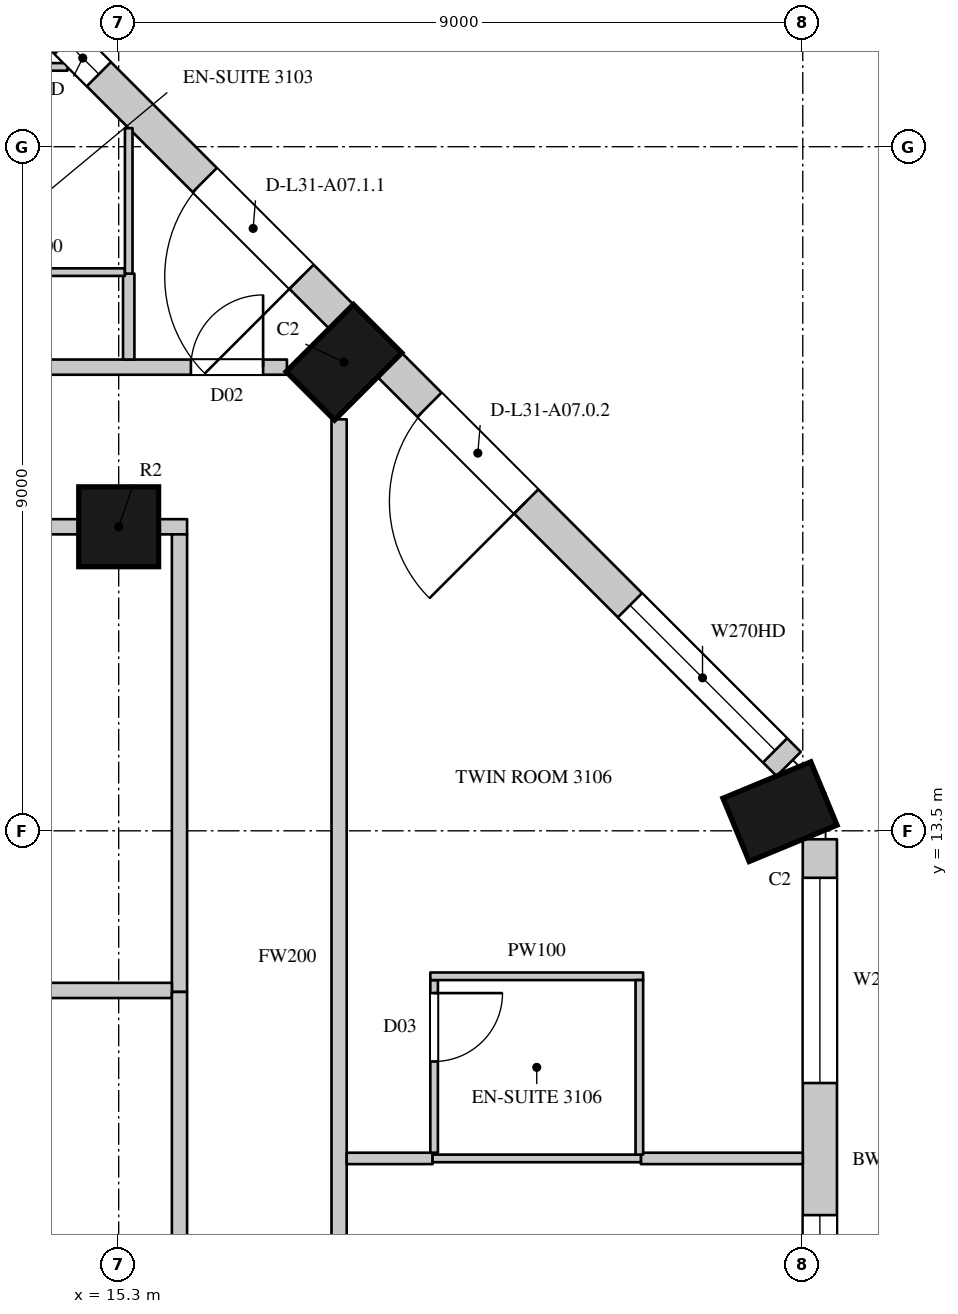
"""IFC4 building model, lengths in metres.
Left out: names, types, materials, properties, quantities, classifications, styles, units other than length and angle.
Written with IfcOpenShell. Run it as: python <this file> out.ifc"""

import sys

from ifc_helpers import new_model, si_unit, direction, frame, frame_2d, origin, origin_2d, place, context, subcontext, project, spatial, rectangle, circle, extrude, element, fill, save


model = new_model("IFC4")
c1 = context("Model", 3, precision=1e-05, world=origin(), true_north=direction((0.0, 1.0)))
c2 = subcontext(c1, "Body", "Model", "MODEL_VIEW")
j1 = project(units=[si_unit("LENGTHUNIT", "METRE"), si_unit("PLANEANGLEUNIT", "RADIAN")], contexts=[c1])
p1 = place(None, origin())
s1 = spatial("IfcSite", under=j1, at=p1, CompositionType="ELEMENT")
p2 = place(p1, origin())
s2 = spatial("IfcBuilding", under=s1, at=p2, CompositionType="ELEMENT")
p3 = place(p2, frame((0.0, 0.0, 141.9)))
s3 = spatial("IfcBuildingStorey", under=s2, at=p3, CompositionType="ELEMENT", Elevation=141.9)
for number, where, z_axis, x_axis in (
    (1, (24.0, 13.752, 0.0), (0.0, 0.0, 1.0), (-0.383, 0.924, 0.0)),
    (2, (18.264, 19.664, 0.0), (0.0, 0.0, 1.0), (-0.707, 0.707, 0.0)),
):
    element("IfcColumn", number, at=place(p3, frame(where, z_axis=z_axis, x_axis=x_axis)), inside=s3, PredefinedType="COLUMN", context=c2, shape_type="SweptSolid", body=[
        extrude(rectangle(XDim=0.9, YDim=1.25, at=origin_2d()), origin(), (0.0, 0.0, 1.0), 3.6),
    ])
p4 = place(p3, frame((15.3, 17.5, 0.0), z_axis=(0.0, 0.0, 1.0), x_axis=(1.0, 0.0, 0.0)))
e3 = element("IfcColumn", 3, at=p4, inside=s3, PredefinedType="COLUMN", context=c2, shape_type="SweptSolid", body=[
    extrude(circle(Radius=0.525, at=origin_2d()), origin(), (0.0, 0.0, 1.0), 3.6),
])
p5 = place(p3, frame((24.525, 4.95, 0.0), z_axis=(0.0, 0.0, 1.0), x_axis=(0.0, 1.0, 0.0)))
e4 = element("IfcWall", 4, at=p5, inside=s3, PredefinedType="SOLIDWALL", context=c2, shape_type="SweptSolid", body=[
    extrude(rectangle(XDim=8.439, YDim=0.45, at=frame_2d((4.219, 0.0))), origin(), (0.0, 0.0, 1.0), 3.3),
])
p6 = place(p5, frame((0.294, 0.0, 0.0)))
e5 = element("IfcOpeningElement", 5, at=p6, cuts=e4, PredefinedType="OPENING", context=c2, shape_type="SweptSolid", body=[
    extrude(rectangle(XDim=1.8, YDim=2.4, at=frame_2d((0.9, 1.2))), frame((0.0, 0.235, 0.0), z_axis=(0.0, -1.0, 0.0), x_axis=(1.0, 0.0, 0.0)), (0.0, 0.0, 1.0), 0.47),
])
p7 = place(p5, frame((2.294, 0.0, 1.05)))
e6 = element("IfcOpeningElement", 6, at=p7, cuts=e4, PredefinedType="OPENING", context=c2, shape_type="SweptSolid", body=[
    extrude(rectangle(XDim=1.2, YDim=2.0, at=frame_2d((0.6, 1.0))), frame((0.0, 0.235, 0.0), z_axis=(0.0, -1.0, 0.0), x_axis=(1.0, 0.0, 0.0)), (0.0, 0.0, 1.0), 0.47),
])
p8 = place(p5, frame((5.232, 0.0, 1.05)))
e7 = element("IfcOpeningElement", 7, at=p8, cuts=e4, PredefinedType="OPENING", context=c2, shape_type="SweptSolid", body=[
    extrude(rectangle(XDim=2.7, YDim=2.0, at=frame_2d((1.35, 1.0))), frame((0.0, 0.235, 0.0), z_axis=(0.0, -1.0, 0.0), x_axis=(1.0, 0.0, 0.0)), (0.0, 0.0, 1.0), 0.47),
])
p9 = place(p3, frame((24.115, 14.379, 0.0), z_axis=(0.0, 0.0, 1.0), x_axis=(-0.707106781187, 0.707106781187, 0.0)))
e8 = element("IfcWall", 8, at=p9, inside=s3, PredefinedType="SOLIDWALL", context=c2, shape_type="SweptSolid", body=[
    extrude(rectangle(XDim=7.424, YDim=0.45, at=frame_2d((3.712, 0.0))), origin(), (0.0, 0.0, 1.0), 3.3),
])
p10 = place(p9, frame((0.253, 0.0, 1.05)))
e9 = element("IfcOpeningElement", 9, at=p10, cuts=e8, PredefinedType="OPENING", context=c2, shape_type="SweptSolid", body=[
    extrude(rectangle(XDim=2.7, YDim=2.0, at=frame_2d((1.35, 1.0))), frame((0.0, 0.235, 0.0), z_axis=(0.0, -1.0, 0.0), x_axis=(1.0, 0.0, 0.0)), (0.0, 0.0, 1.0), 0.47),
])
p11 = place(p9, frame((4.884, 0.0, 0.0)))
e10 = element("IfcOpeningElement", 10, at=p11, cuts=e8, PredefinedType="OPENING", context=c2, shape_type="SweptSolid", body=[
    extrude(rectangle(XDim=1.8, YDim=2.4, at=frame_2d((0.9, 1.2))), frame((0.0, 0.235, 0.0), z_axis=(0.0, -1.0, 0.0), x_axis=(1.0, 0.0, 0.0)), (0.0, 0.0, 1.0), 0.47),
])
p12 = place(p3, frame((18.229, 20.265, 0.0), z_axis=(0.0, 0.0, 1.0), x_axis=(-0.707106781187, 0.707106781187, 0.0)))
e11 = element("IfcWall", 11, at=p12, inside=s3, PredefinedType="SOLIDWALL", context=c2, shape_type="SweptSolid", body=[
    extrude(rectangle(XDim=7.424, YDim=0.45, at=frame_2d((3.712, 0.0))), origin(), (0.0, 0.0, 1.0), 3.3),
])
p13 = place(p12, frame((0.74, 0.0, 0.0)))
e12 = element("IfcOpeningElement", 12, at=p13, cuts=e11, PredefinedType="OPENING", context=c2, shape_type="SweptSolid", body=[
    extrude(rectangle(XDim=1.8, YDim=2.4, at=frame_2d((0.9, 1.2))), frame((0.0, 0.235, 0.0), z_axis=(0.0, -1.0, 0.0), x_axis=(1.0, 0.0, 0.0)), (0.0, 0.0, 1.0), 0.47),
])
p14 = place(p12, frame((4.51, 0.0, 1.05)))
e13 = element("IfcOpeningElement", 13, at=p14, cuts=e11, PredefinedType="OPENING", context=c2, shape_type="SweptSolid", body=[
    extrude(rectangle(XDim=0.6, YDim=2.0, at=frame_2d((0.3, 1.0))), frame((0.0, 0.235, 0.0), z_axis=(0.0, -1.0, 0.0), x_axis=(1.0, 0.0, 0.0)), (0.0, 0.0, 1.0), 0.47),
])
p15 = place(p12, frame((5.861, 0.0, 1.05)))
e14 = element("IfcOpeningElement", 14, at=p15, cuts=e11, PredefinedType="OPENING", context=c2, shape_type="SweptSolid", body=[
    extrude(rectangle(XDim=1.2, YDim=2.0, at=frame_2d((0.6, 1.0))), frame((0.0, 0.235, 0.0), z_axis=(0.0, -1.0, 0.0), x_axis=(1.0, 0.0, 0.0)), (0.0, 0.0, 1.0), 0.47),
])
p16 = place(p3, frame((23.15, 16.864, 0.0), z_axis=(0.0, 0.0, 1.0), x_axis=(-0.707106781187, 0.707106781187, 0.0)))
e15 = element("IfcWall", 15, at=p16, inside=s3, PredefinedType="SOLIDWALL", context=c2, shape_type="SweptSolid", body=[
    extrude(rectangle(XDim=1.445, YDim=0.45, at=frame_2d((0.722, 0.0))), origin(), (0.0, 0.0, 1.0), 0.6),
])
p17 = place(p3, frame((19.937, 20.078, 0.0), z_axis=(0.0, 0.0, 1.0), x_axis=(-0.707106781187, 0.707106781187, 0.0)))
e16 = element("IfcWall", 16, at=p17, inside=s3, PredefinedType="SOLIDWALL", context=c2, shape_type="SweptSolid", body=[
    extrude(rectangle(XDim=1.781, YDim=0.45, at=frame_2d((0.89, 0.0))), origin(), (0.0, 0.0, 1.0), 0.6),
])
p18 = place(p3, frame((16.486, 23.529, 0.0), z_axis=(0.0, 0.0, 1.0), x_axis=(-0.707022305137, 0.707191247145, 0.0)))
e17 = element("IfcWall", 17, at=p18, inside=s3, PredefinedType="SOLIDWALL", context=c2, shape_type="SweptSolid", body=[
    extrude(rectangle(XDim=1.445, YDim=0.45, at=frame_2d((0.723, 0.0))), origin(), (0.0, 0.0, 1.0), 0.6),
])
p19 = place(p3, frame((-20.7, 19.6, 0.0), z_axis=(0.0, 0.0, 1.0), x_axis=(1.0, 0.0, 0.0)))
e18 = element("IfcWall", 18, at=p19, inside=s3, PredefinedType="PARTITIONING", context=c2, shape_type="SweptSolid", body=[
    extrude(rectangle(XDim=38.214, YDim=0.2, at=frame_2d((19.107, 0.0))), origin(), (0.0, 0.0, 1.0), 3.3),
])
p20 = place(p19, frame((23.95, 0.0, 0.0)))
e19 = element("IfcOpeningElement", 19, at=p20, cuts=e18, PredefinedType="OPENING", context=c2, shape_type="SweptSolid", body=[
    extrude(rectangle(XDim=0.9, YDim=2.2, at=frame_2d((0.45, 1.1))), frame((0.0, 0.11, 0.0), z_axis=(0.0, -1.0, 0.0), x_axis=(1.0, 0.0, 0.0)), (0.0, 0.0, 1.0), 0.22),
])
p21 = place(p19, frame((2.05, 0.0, 0.0)))
e20 = element("IfcOpeningElement", 20, at=p21, cuts=e18, PredefinedType="OPENING", context=c2, shape_type="SweptSolid", body=[
    extrude(rectangle(XDim=1.1, YDim=2.4, at=frame_2d((0.55, 1.2))), frame((0.0, 0.11, 0.0), z_axis=(0.0, -1.0, 0.0), x_axis=(1.0, 0.0, 0.0)), (0.0, 0.0, 1.0), 0.22),
])
p22 = place(p19, frame((12.15, 0.0, 0.0)))
e21 = element("IfcOpeningElement", 21, at=p22, cuts=e18, PredefinedType="OPENING", context=c2, shape_type="SweptSolid", body=[
    extrude(rectangle(XDim=1.1, YDim=2.4, at=frame_2d((0.55, 1.2))), frame((0.0, 0.11, 0.0), z_axis=(0.0, -1.0, 0.0), x_axis=(1.0, 0.0, 0.0)), (0.0, 0.0, 1.0), 0.22),
])
p23 = place(p19, frame((30.2, 0.0, 0.0)))
e22 = element("IfcOpeningElement", 22, at=p23, cuts=e18, PredefinedType="OPENING", context=c2, shape_type="SweptSolid", body=[
    extrude(rectangle(XDim=0.95, YDim=2.2, at=frame_2d((0.475, 1.1))), frame((0.0, 0.11, 0.0), z_axis=(0.0, -1.0, 0.0), x_axis=(1.0, 0.0, 0.0)), (0.0, 0.0, 1.0), 0.22),
])
p24 = place(p19, frame((36.95, 0.0, 0.0)))
e23 = element("IfcOpeningElement", 23, at=p24, cuts=e18, PredefinedType="OPENING", context=c2, shape_type="SweptSolid", body=[
    extrude(rectangle(XDim=0.95, YDim=2.2, at=frame_2d((0.475, 1.1))), frame((0.0, 0.11, 0.0), z_axis=(0.0, -1.0, 0.0), x_axis=(1.0, 0.0, 0.0)), (0.0, 0.0, 1.0), 0.22),
])
p25 = place(p3, frame((6.825, 17.5, 0.0), z_axis=(0.0, 0.0, 1.0), x_axis=(1.0, 0.0, 0.0)))
e24 = element("IfcWall", 24, at=p25, inside=s3, PredefinedType="PARTITIONING", context=c2, shape_type="SweptSolid", body=[
    extrude(rectangle(XDim=7.95, YDim=0.2, at=frame_2d((3.975, 0.0))), origin(), (0.0, 0.0, 1.0), 2.75),
])
p26 = place(p25, frame((3.8, 0.0, 0.0)))
e25 = element("IfcOpeningElement", 25, at=p26, cuts=e24, PredefinedType="OPENING", context=c2, shape_type="SweptSolid", body=[
    extrude(rectangle(XDim=0.95, YDim=2.2, at=frame_2d((0.475, 1.1))), frame((0.0, 0.11, 0.0), z_axis=(0.0, -1.0, 0.0), x_axis=(1.0, 0.0, 0.0)), (0.0, 0.0, 1.0), 0.22),
])
p27 = place(p3, frame((15.825, 17.5, 0.0), z_axis=(0.0, 0.0, 1.0), x_axis=(1.0, 0.0, 0.0)))
e26 = element("IfcWall", 26, at=p27, inside=s3, PredefinedType="PARTITIONING", context=c2, shape_type="SweptSolid", body=[
    extrude(rectangle(XDim=0.375, YDim=0.2, at=frame_2d((0.188, 0.0))), origin(), (0.0, 0.0, 1.0), 3.3),
])
p28 = place(p3, frame((16.1, 11.38, 0.0), z_axis=(0.0, 0.0, 1.0), x_axis=(0.0, 1.0, 0.0)))
e27 = element("IfcWall", 27, at=p28, inside=s3, PredefinedType="PARTITIONING", context=c2, shape_type="SweptSolid", body=[
    extrude(rectangle(XDim=6.02, YDim=0.2, at=frame_2d((3.01, 0.0))), origin(), (0.0, 0.0, 1.0), 3.3),
])
p29 = place(p3, frame((18.2, 4.75, 0.0), z_axis=(0.0, 0.0, 1.0), x_axis=(0.0, 1.0, 0.0)))
e28 = element("IfcWall", 28, at=p29, inside=s3, PredefinedType="PARTITIONING", context=c2, shape_type="SweptSolid", body=[
    extrude(rectangle(XDim=14.164, YDim=0.2, at=frame_2d((7.082, 0.0))), origin(), (0.0, 0.0, 1.0), 3.3),
])
p30 = place(p29, frame((1.7, 0.0, 0.0)))
e29 = element("IfcOpeningElement", 29, at=p30, cuts=e28, PredefinedType="OPENING", context=c2, shape_type="SweptSolid", body=[
    extrude(rectangle(XDim=0.9, YDim=2.2, at=frame_2d((0.45, 1.1))), frame((0.0, 0.11, 0.0), z_axis=(0.0, -1.0, 0.0), x_axis=(1.0, 0.0, 0.0)), (0.0, 0.0, 1.0), 0.22),
])
p31 = place(p3, frame((15.432, 19.7, 0.0), z_axis=(0.0, 0.0, 1.0), x_axis=(0.0, 1.0, 0.0)))
e30 = element("IfcWall", 30, at=p31, inside=s3, PredefinedType="PARTITIONING", context=c2, shape_type="SweptSolid", body=[
    extrude(rectangle(XDim=1.13, YDim=0.15, at=frame_2d((0.565, 0.0))), origin(), (0.0, 0.0, 1.0), 3.3),
])
p32 = place(p3, frame((18.3, 9.19, 0.0), z_axis=(0.0, 0.0, 1.0), x_axis=(1.0, 0.0, 0.0)))
e31 = element("IfcWall", 31, at=p32, inside=s3, PredefinedType="PARTITIONING", context=c2, shape_type="SweptSolid", body=[
    extrude(rectangle(XDim=1.13, YDim=0.15, at=frame_2d((0.565, 0.0))), origin(), (0.0, 0.0, 1.0), 3.3),
])
p33 = place(p3, frame((22.17, 9.19, 0.0), z_axis=(0.0, 0.0, 1.0), x_axis=(1.0, 0.0, 0.0)))
e32 = element("IfcWall", 32, at=p33, inside=s3, PredefinedType="PARTITIONING", context=c2, shape_type="SweptSolid", body=[
    extrude(rectangle(XDim=2.13, YDim=0.15, at=frame_2d((1.065, 0.0))), origin(), (0.0, 0.0, 1.0), 3.3),
])
p34 = place(p3, frame((10.4, 11.4, 0.0), z_axis=(0.0, 0.0, 1.0), x_axis=(1.0, 0.0, 0.0)))
e33 = element("IfcWall", 33, at=p34, inside=s3, PredefinedType="PARTITIONING", context=c2, shape_type="SweptSolid", body=[
    extrude(rectangle(XDim=5.6, YDim=0.2, at=frame_2d((2.8, 0.0))), origin(), (0.0, 0.0, 1.0), 3.3),
])
p35 = place(p3, frame((16.1, 6.825, 0.0), z_axis=(0.0, 0.0, 1.0), x_axis=(0.0, 1.0, 0.0)))
e34 = element("IfcWall", 34, at=p35, inside=s3, PredefinedType="PARTITIONING", context=c2, shape_type="SweptSolid", body=[
    extrude(rectangle(XDim=4.555, YDim=0.2, at=frame_2d((2.277, 0.0))), origin(), (0.0, 0.0, 1.0), 3.3),
])
p36 = place(p3, frame((12.986, 20.85, 0.0), z_axis=(0.0, 0.0, 1.0), x_axis=(1.0, 0.0, 0.0)))
e35 = element("IfcWall", 35, at=p36, inside=s3, PredefinedType="PARTITIONING", context=c2, shape_type="SweptSolid", body=[
    extrude(rectangle(XDim=2.396, YDim=0.1, at=frame_2d((1.198, 0.0))), origin(), (0.0, 0.0, 1.0), 3.3),
])
p37 = place(p3, frame((12.986, 23.55, 0.0), z_axis=(0.0, 0.0, 1.0), x_axis=(1.0, 0.0, 0.0)))
e36 = element("IfcWall", 36, at=p37, inside=s3, PredefinedType="PARTITIONING", context=c2, shape_type="SweptSolid", body=[
    extrude(rectangle(XDim=1.64, YDim=0.1, at=frame_2d((0.82, 0.0))), origin(), (0.0, 0.0, 1.0), 3.3),
])
p38 = place(p3, frame((15.432, 20.83, 0.0), z_axis=(0.0, 0.0, 1.0), x_axis=(0.0, 1.0, 0.0)))
e37 = element("IfcWall", 37, at=p38, inside=s3, PredefinedType="PARTITIONING", context=c2, shape_type="SweptSolid", body=[
    extrude(rectangle(XDim=1.914, YDim=0.1, at=frame_2d((0.957, 0.0))), origin(), (0.0, 0.0, 1.0), 3.3),
])
p39 = place(p3, frame((19.43, 9.19, 0.0), z_axis=(0.0, 0.0, 1.0), x_axis=(1.0, 0.0, 0.0)))
e38 = element("IfcWall", 38, at=p39, inside=s3, PredefinedType="PARTITIONING", context=c2, shape_type="SweptSolid", body=[
    extrude(rectangle(XDim=2.74, YDim=0.1, at=frame_2d((1.37, 0.0))), origin(), (0.0, 0.0, 1.0), 3.3),
])
p40 = place(p3, frame((19.45, 9.265, 0.0), z_axis=(0.0, 0.0, 1.0), x_axis=(0.0, 1.0, 0.0)))
e39 = element("IfcWall", 39, at=p40, inside=s3, PredefinedType="PARTITIONING", context=c2, shape_type="SweptSolid", body=[
    extrude(rectangle(XDim=2.271, YDim=0.1, at=frame_2d((1.135, 0.0))), origin(), (0.0, 0.0, 1.0), 3.3),
])
p41 = place(p40, frame((1.2, 0.0, 0.0)))
e40 = element("IfcOpeningElement", 40, at=p41, cuts=e39, PredefinedType="OPENING", context=c2, shape_type="SweptSolid", body=[
    extrude(rectangle(XDim=0.9, YDim=2.2, at=frame_2d((0.45, 1.1))), frame((0.0, 0.06, 0.0), z_axis=(0.0, -1.0, 0.0), x_axis=(1.0, 0.0, 0.0)), (0.0, 0.0, 1.0), 0.12),
])
p42 = place(p3, frame((19.4, 11.586, 0.0), z_axis=(0.0, 0.0, 1.0), x_axis=(1.0, 0.0, 0.0)))
e41 = element("IfcWall", 41, at=p42, inside=s3, PredefinedType="PARTITIONING", context=c2, shape_type="SweptSolid", body=[
    extrude(rectangle(XDim=2.8, YDim=0.1, at=frame_2d((1.4, 0.0))), origin(), (0.0, 0.0, 1.0), 3.3),
])
p43 = place(p3, frame((22.15, 9.24, 0.0), z_axis=(0.0, 0.0, 1.0), x_axis=(0.0, 1.0, 0.0)))
e42 = element("IfcWall", 42, at=p43, inside=s3, PredefinedType="PARTITIONING", context=c2, shape_type="SweptSolid", body=[
    extrude(rectangle(XDim=2.296, YDim=0.1, at=frame_2d((1.148, 0.0))), origin(), (0.0, 0.0, 1.0), 3.3),
])
p44 = place(p7, origin())
e43 = element("IfcWindow", 43, at=p44, inside=s3, PartitioningType="SINGLE_PANEL", PredefinedType="WINDOW", context=c2, shape_type="SweptSolid", body=[
    extrude(rectangle(XDim=1.2, YDim=2.0, at=frame_2d((0.6, 1.0))), frame((0.0, 0.135, 0.0), z_axis=(0.0, -1.0, 0.0), x_axis=(1.0, 0.0, 0.0)), (0.0, 0.0, 1.0), 0.06),
])
fill(e6, e43)
p45 = place(p8, origin())
e44 = element("IfcWindow", 44, at=p45, inside=s3, PartitioningType="SINGLE_PANEL", PredefinedType="WINDOW", context=c2, shape_type="SweptSolid", body=[
    extrude(rectangle(XDim=2.7, YDim=2.0, at=frame_2d((1.35, 1.0))), frame((0.0, 0.135, 0.0), z_axis=(0.0, -1.0, 0.0), x_axis=(1.0, 0.0, 0.0)), (0.0, 0.0, 1.0), 0.06),
])
fill(e7, e44)
p46 = place(p10, origin())
e45 = element("IfcWindow", 45, at=p46, inside=s3, PartitioningType="SINGLE_PANEL", PredefinedType="WINDOW", context=c2, shape_type="SweptSolid", body=[
    extrude(rectangle(XDim=2.7, YDim=2.0, at=frame_2d((1.35, 1.0))), frame((0.0, 0.135, 0.0), z_axis=(0.0, -1.0, 0.0), x_axis=(1.0, 0.0, 0.0)), (0.0, 0.0, 1.0), 0.06),
])
fill(e9, e45)
p47 = place(p11, origin())
e46 = element("IfcDoor", 46, at=p47, inside=s3, OperationType="SLIDING_TO_LEFT", PredefinedType="DOOR", context=c2, shape_type="SweptSolid", body=[
    extrude(rectangle(XDim=1.8, YDim=2.4, at=frame_2d((0.9, 1.2))), frame((0.0, 0.13, 0.0), z_axis=(0.0, -1.0, 0.0), x_axis=(1.0, 0.0, 0.0)), (0.0, 0.0, 1.0), 0.05),
])
fill(e10, e46)
p48 = place(p13, origin())
e47 = element("IfcDoor", 47, at=p48, inside=s3, OperationType="SLIDING_TO_LEFT", PredefinedType="DOOR", context=c2, shape_type="SweptSolid", body=[
    extrude(rectangle(XDim=1.8, YDim=2.4, at=frame_2d((0.9, 1.2))), frame((0.0, 0.13, 0.0), z_axis=(0.0, -1.0, 0.0), x_axis=(1.0, 0.0, 0.0)), (0.0, 0.0, 1.0), 0.05),
])
fill(e12, e47)
p49 = place(p24, origin())
e48 = element("IfcDoor", 48, at=p49, inside=s3, OperationType="SINGLE_SWING_RIGHT", PredefinedType="DOOR", context=c2, shape_type="SweptSolid", body=[
    extrude(rectangle(XDim=0.95, YDim=2.2, at=frame_2d((0.475, 1.1))), frame((0.0, 0.025, 0.0), z_axis=(0.0, -1.0, 0.0), x_axis=(1.0, 0.0, 0.0)), (0.0, 0.0, 1.0), 0.05),
])
fill(e23, e48)
p50 = place(p41, origin())
e49 = element("IfcDoor", 49, at=p50, inside=s3, OperationType="SINGLE_SWING_LEFT", PredefinedType="DOOR", context=c2, shape_type="SweptSolid", body=[
    extrude(rectangle(XDim=0.9, YDim=2.2, at=frame_2d((0.45, 1.1))), frame((0.0, 0.025, 0.0), z_axis=(0.0, -1.0, 0.0), x_axis=(1.0, 0.0, 0.0)), (0.0, 0.0, 1.0), 0.05),
])
fill(e40, e49)
p51 = place(p14, origin())
e50 = element("IfcWindow", 50, at=p51, inside=s3, PartitioningType="SINGLE_PANEL", PredefinedType="WINDOW", context=c2, shape_type="SweptSolid", body=[
    extrude(rectangle(XDim=0.6, YDim=2.0, at=frame_2d((0.3, 1.0))), frame((0.0, 0.135, 0.0), z_axis=(0.0, -1.0, 0.0), x_axis=(1.0, 0.0, 0.0)), (0.0, 0.0, 1.0), 0.06),
])
fill(e13, e50)
save(model, sys.argv[1])
